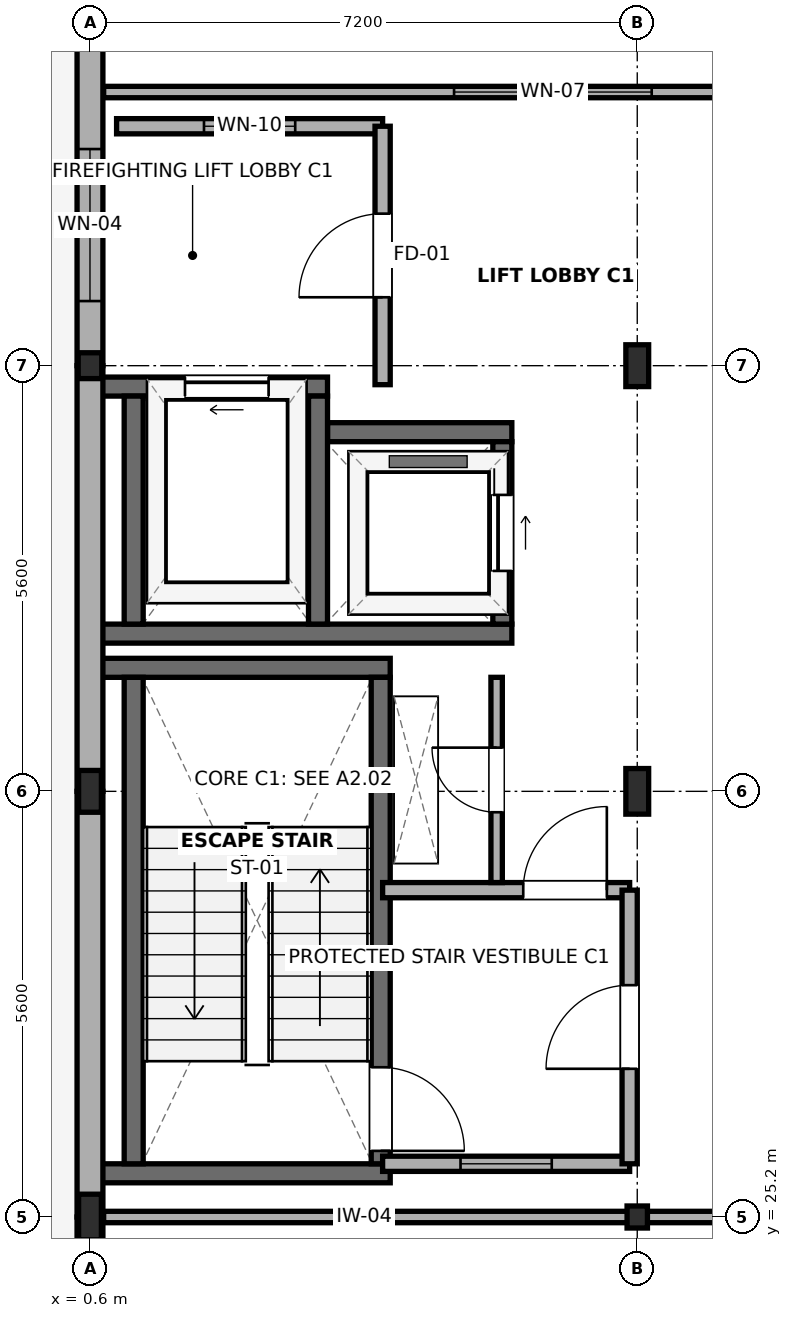
"""IFC4 building model, lengths in metres.
Left out: names, types, materials, properties, quantities, classifications, styles, units other than length and angle.
Written with IfcOpenShell. Run it as: python <this file> out.ifc"""

import sys

from ifc_helpers import new_model, si_unit, direction, frame, frame_2d, origin, origin_2d, place, context, subcontext, project, spatial, rectangle, i_section, extrude, element, fill, save


model = new_model("IFC4")
c1 = context("Model", 3, precision=1e-05, world=origin(), true_north=direction((0.0, 1.0)))
c2 = subcontext(c1, "Body", "Model", "MODEL_VIEW")
j1 = project(units=[si_unit("LENGTHUNIT", "METRE"), si_unit("PLANEANGLEUNIT", "RADIAN")], contexts=[c1])
p1 = place(None, origin())
s1 = spatial("IfcSite", under=j1, at=p1, CompositionType="ELEMENT")
p2 = place(p1, origin())
s2 = spatial("IfcBuilding", under=s1, at=p2, CompositionType="ELEMENT")
p3 = place(p2, frame((0.0, 0.0, 13.2)))
s3 = spatial("IfcBuildingStorey", under=s2, at=p3, CompositionType="ELEMENT", Elevation=13.2)
p4 = place(p3, frame((0.6, 25.2, 0.0), z_axis=(0.0, 0.0, 1.0), x_axis=(1.0, 0.0, 0.0)))
e1 = element("IfcColumn", 1, at=p4, inside=s3, PredefinedType="COLUMN", context=c2, shape_type="SweptSolid", body=[
    extrude(i_section(OverallWidth=0.3, OverallDepth=0.6, WebThickness=0.015, FlangeThickness=0.03, FilletRadius=0.027, at=origin_2d()), origin(), (0.0, 0.0, 1.0), 3.9),
])
p5 = place(p3, frame((0.6, 30.8, 0.0), z_axis=(0.0, 0.0, 1.0), x_axis=(1.0, 0.0, 0.0)))
e2 = element("IfcColumn", 2, at=p5, inside=s3, PredefinedType="COLUMN", context=c2, shape_type="SweptSolid", body=[
    extrude(i_section(OverallWidth=0.3, OverallDepth=0.55, WebThickness=0.015, FlangeThickness=0.029, FilletRadius=0.027, at=origin_2d()), origin(), (0.0, 0.0, 1.0), 3.9),
])
p6 = place(p3, frame((0.6, 36.4, 0.0), z_axis=(0.0, 0.0, 1.0), x_axis=(1.0, 0.0, 0.0)))
e3 = element("IfcColumn", 3, at=p6, inside=s3, PredefinedType="COLUMN", context=c2, shape_type="SweptSolid", body=[
    extrude(i_section(OverallWidth=0.31, OverallDepth=0.34, WebThickness=0.021, FlangeThickness=0.039, FilletRadius=0.027, at=origin_2d()), origin(), (0.0, 0.0, 1.0), 3.9),
])
p7 = place(p3, frame((7.8, 25.2, 0.0), z_axis=(0.0, 0.0, 1.0), x_axis=(1.0, 0.0, 0.0)))
e4 = element("IfcColumn", 4, at=p7, inside=s3, PredefinedType="COLUMN", context=c2, shape_type="SweptSolid", body=[
    extrude(i_section(OverallWidth=0.268, OverallDepth=0.29, WebThickness=0.018, FlangeThickness=0.032, FilletRadius=0.024, at=origin_2d()), origin(), (0.0, 0.0, 1.0), 3.9),
])
p8 = place(p3, frame((7.8, 30.8, 0.0), z_axis=(0.0, 0.0, 1.0), x_axis=(1.0, 0.0, 0.0)))
e5 = element("IfcColumn", 5, at=p8, inside=s3, PredefinedType="COLUMN", context=c2, shape_type="SweptSolid", body=[
    extrude(i_section(OverallWidth=0.3, OverallDepth=0.6, WebThickness=0.015, FlangeThickness=0.03, FilletRadius=0.027, at=origin_2d()), origin(), (0.0, 0.0, 1.0), 3.9),
])
p9 = place(p3, frame((7.8, 36.4, 0.0), z_axis=(0.0, 0.0, 1.0), x_axis=(1.0, 0.0, 0.0)))
e6 = element("IfcColumn", 6, at=p9, inside=s3, PredefinedType="COLUMN", context=c2, shape_type="SweptSolid", body=[
    extrude(i_section(OverallWidth=0.3, OverallDepth=0.55, WebThickness=0.015, FlangeThickness=0.029, FilletRadius=0.027, at=origin_2d()), origin(), (0.0, 0.0, 1.0), 3.9),
])
for number, where, z_axis, x_axis in (
    (7, (0.75, 25.775, 0.0), (0.0, 0.0, 1.0), (1.0, 0.0, 0.0)),
    (8, (0.75, 32.425, 0.0), (0.0, 0.0, 1.0), (1.0, 0.0, 0.0)),
):
    element("IfcWall", number, at=place(p3, frame(where, z_axis=z_axis, x_axis=x_axis)), inside=s3, PredefinedType="SHEAR", context=c2, shape_type="SweptSolid", body=[
        extrude(rectangle(XDim=3.8, YDim=0.25, at=frame_2d((1.9, 0.0))), origin(), (0.0, 0.0, 1.0), 3.7),
    ])
p10 = place(p3, frame((1.175, 25.9, 0.0), z_axis=(0.0, 0.0, 1.0), x_axis=(0.0, 1.0, 0.0)))
e9 = element("IfcWall", 9, at=p10, inside=s3, PredefinedType="SHEAR", context=c2, shape_type="SweptSolid", body=[
    extrude(rectangle(XDim=6.4, YDim=0.25, at=frame_2d((3.2, 0.0))), origin(), (0.0, 0.0, 1.0), 3.7),
])
p11 = place(p3, frame((4.425, 25.9, 0.0), z_axis=(0.0, 0.0, 1.0), x_axis=(0.0, 1.0, 0.0)))
e10 = element("IfcWall", 10, at=p11, inside=s3, PredefinedType="SHEAR", context=c2, shape_type="SweptSolid", body=[
    extrude(rectangle(XDim=6.4, YDim=0.25, at=frame_2d((3.2, 0.0))), origin(), (0.0, 0.0, 1.0), 3.7),
])
p12 = place(p11, frame((0.17, 0.0, 0.0)))
e11 = element("IfcOpeningElement", 11, at=p12, cuts=e10, PredefinedType="OPENING", context=c2, shape_type="SweptSolid", body=[
    extrude(rectangle(XDim=1.1, YDim=2.15, at=frame_2d((0.55, 1.075))), frame((0.0, 0.14, 0.0), z_axis=(0.0, -1.0, 0.0), x_axis=(1.0, 0.0, 0.0)), (0.0, 0.0, 1.0), 0.28),
])
p13 = place(p3, frame((0.75, 32.875, 0.0), z_axis=(0.0, 0.0, 1.0), x_axis=(1.0, 0.0, 0.0)))
e12 = element("IfcWall", 12, at=p13, inside=s3, PredefinedType="SHEAR", context=c2, shape_type="SweptSolid", body=[
    extrude(rectangle(XDim=5.4, YDim=0.25, at=frame_2d((2.7, 0.0))), origin(), (0.0, 0.0, 1.0), 3.7),
])
p14 = place(p3, frame((0.75, 36.125, 0.0), z_axis=(0.0, 0.0, 1.0), x_axis=(1.0, 0.0, 0.0)))
e13 = element("IfcWall", 13, at=p14, inside=s3, PredefinedType="SHEAR", context=c2, shape_type="SweptSolid", body=[
    extrude(rectangle(XDim=2.975, YDim=0.25, at=frame_2d((1.488, 0.0))), origin(), (0.0, 0.0, 1.0), 3.7),
])
p15 = place(p14, frame((1.1, 0.0, 0.0)))
e14 = element("IfcOpeningElement", 14, at=p15, cuts=e13, PredefinedType="OPENING", context=c2, shape_type="SweptSolid", body=[
    extrude(rectangle(XDim=1.1, YDim=2.15, at=frame_2d((0.55, 1.075))), frame((0.0, 0.14, 0.0), z_axis=(0.0, -1.0, 0.0), x_axis=(1.0, 0.0, 0.0)), (0.0, 0.0, 1.0), 0.28),
])
p16 = place(p3, frame((3.725, 35.525, 0.0), z_axis=(0.0, 0.0, 1.0), x_axis=(1.0, 0.0, 0.0)))
e15 = element("IfcWall", 15, at=p16, inside=s3, PredefinedType="SHEAR", context=c2, shape_type="SweptSolid", body=[
    extrude(rectangle(XDim=2.425, YDim=0.25, at=frame_2d((1.212, 0.0))), origin(), (0.0, 0.0, 1.0), 3.7),
])
for number, where, z_axis, x_axis in (
    (16, (1.175, 33.0, 0.0), (0.0, 0.0, 1.0), (0.0, 1.0, 0.0)),
    (17, (3.6, 33.0, 0.0), (0.0, 0.0, 1.0), (0.0, 1.0, 0.0)),
):
    element("IfcWall", number, at=place(p3, frame(where, z_axis=z_axis, x_axis=x_axis)), inside=s3, PredefinedType="SHEAR", context=c2, shape_type="SweptSolid", body=[
        extrude(rectangle(XDim=3.0, YDim=0.25, at=frame_2d((1.5, 0.0))), origin(), (0.0, 0.0, 1.0), 3.7),
    ])
p17 = place(p3, frame((6.025, 33.0, 0.0), z_axis=(0.0, 0.0, 1.0), x_axis=(0.0, 1.0, 0.0)))
e18 = element("IfcWall", 18, at=p17, inside=s3, PredefinedType="SHEAR", context=c2, shape_type="SweptSolid", body=[
    extrude(rectangle(XDim=2.4, YDim=0.25, at=frame_2d((1.2, 0.0))), origin(), (0.0, 0.0, 1.0), 3.7),
])
p18 = place(p17, frame((0.7, 0.0, 0.0)))
e19 = element("IfcOpeningElement", 19, at=p18, cuts=e18, PredefinedType="OPENING", context=c2, shape_type="SweptSolid", body=[
    extrude(rectangle(XDim=1.0, YDim=2.15, at=frame_2d((0.5, 1.075))), frame((0.0, 0.14, 0.0), z_axis=(0.0, -1.0, 0.0), x_axis=(1.0, 0.0, 0.0)), (0.0, 0.0, 1.0), 0.28),
])
p19 = place(p3, frame((0.6, 17.23, 0.0), z_axis=(0.0, 0.0, 1.0), x_axis=(0.0, 1.0, 0.0)))
e20 = element("IfcWall", 20, at=p19, inside=s3, PredefinedType="SOLIDWALL", context=c2, shape_type="SweptSolid", body=[
    extrude(rectangle(XDim=7.97, YDim=0.34, at=frame_2d((3.985, 0.0))), origin(), (0.0, 0.0, 1.0), 3.145),
])
p20 = place(p3, frame((0.6, 25.2, 0.0), z_axis=(0.0, 0.0, 1.0), x_axis=(0.0, 1.0, 0.0)))
e21 = element("IfcWall", 21, at=p20, inside=s3, PredefinedType="SOLIDWALL", context=c2, shape_type="SweptSolid", body=[
    extrude(rectangle(XDim=5.6, YDim=0.34, at=frame_2d((2.8, 0.0))), origin(), (0.0, 0.0, 1.0), 3.195),
])
p21 = place(p3, frame((0.6, 30.8, 0.0), z_axis=(0.0, 0.0, 1.0), x_axis=(0.0, 1.0, 0.0)))
e22 = element("IfcWall", 22, at=p21, inside=s3, PredefinedType="SOLIDWALL", context=c2, shape_type="SweptSolid", body=[
    extrude(rectangle(XDim=5.6, YDim=0.34, at=frame_2d((2.8, 0.0))), origin(), (0.0, 0.0, 1.0), 3.245),
])
p22 = place(p3, frame((0.6, 36.4, 0.0), z_axis=(0.0, 0.0, 1.0), x_axis=(0.0, 1.0, 0.0)))
e23 = element("IfcWall", 23, at=p22, inside=s3, PredefinedType="SOLIDWALL", context=c2, shape_type="SweptSolid", body=[
    extrude(rectangle(XDim=5.6, YDim=0.34, at=frame_2d((2.8, 0.0))), origin(), (0.0, 0.0, 1.0), 3.245),
])
p23 = place(p22, frame((0.85, 0.0, 0.9)))
e24 = element("IfcOpeningElement", 24, at=p23, cuts=e23, PredefinedType="OPENING", context=c2, shape_type="SweptSolid", body=[
    extrude(rectangle(XDim=2.0, YDim=1.8, at=frame_2d((1.0, 0.9))), frame((0.0, 0.185, 0.0), z_axis=(0.0, -1.0, 0.0), x_axis=(1.0, 0.0, 0.0)), (0.0, 0.0, 1.0), 0.37),
])
p24 = place(p3, frame((0.95, 39.55, 0.0), z_axis=(0.0, 0.0, 1.0), x_axis=(1.0, 0.0, 0.0)))
e25 = element("IfcWall", 25, at=p24, inside=s3, PredefinedType="PARTITIONING", context=c2, shape_type="SweptSolid", body=[
    extrude(rectangle(XDim=3.5, YDim=0.2, at=frame_2d((1.75, 0.0))), origin(), (0.0, 0.0, 1.0), 3.695),
])
p25 = place(p24, frame((1.15, 0.0, 0.95)))
e26 = element("IfcOpeningElement", 26, at=p25, cuts=e25, PredefinedType="OPENING", context=c2, shape_type="SweptSolid", body=[
    extrude(rectangle(XDim=1.2, YDim=1.5, at=frame_2d((0.6, 0.75))), frame((0.0, 0.115, 0.0), z_axis=(0.0, -1.0, 0.0), x_axis=(1.0, 0.0, 0.0)), (0.0, 0.0, 1.0), 0.23),
])
p26 = place(p3, frame((4.45, 36.15, 0.0), z_axis=(0.0, 0.0, 1.0), x_axis=(0.0, 1.0, 0.0)))
e27 = element("IfcWall", 27, at=p26, inside=s3, PredefinedType="PARTITIONING", context=c2, shape_type="SweptSolid", body=[
    extrude(rectangle(XDim=3.4, YDim=0.2, at=frame_2d((1.7, 0.0))), origin(), (0.0, 0.0, 1.0), 3.345),
])
p27 = place(p26, frame((1.15, 0.0, 0.0)))
e28 = element("IfcOpeningElement", 28, at=p27, cuts=e27, PredefinedType="OPENING", context=c2, shape_type="SweptSolid", body=[
    extrude(rectangle(XDim=1.1, YDim=2.15, at=frame_2d((0.55, 1.075))), frame((0.0, 0.115, 0.0), z_axis=(0.0, -1.0, 0.0), x_axis=(1.0, 0.0, 0.0)), (0.0, 0.0, 1.0), 0.23),
])
p28 = place(p3, frame((4.45, 25.9, 0.0), z_axis=(0.0, 0.0, 1.0), x_axis=(1.0, 0.0, 0.0)))
e29 = element("IfcWall", 29, at=p28, inside=s3, PredefinedType="PARTITIONING", context=c2, shape_type="SweptSolid", body=[
    extrude(rectangle(XDim=3.25, YDim=0.2, at=frame_2d((1.625, 0.0))), origin(), (0.0, 0.0, 1.0), 3.095),
])
p29 = place(p28, frame((1.025, 0.0, 0.95)))
e30 = element("IfcOpeningElement", 30, at=p29, cuts=e29, PredefinedType="OPENING", context=c2, shape_type="SweptSolid", body=[
    extrude(rectangle(XDim=1.2, YDim=1.5, at=frame_2d((0.6, 0.75))), frame((0.0, 0.115, 0.0), z_axis=(0.0, -1.0, 0.0), x_axis=(1.0, 0.0, 0.0)), (0.0, 0.0, 1.0), 0.23),
])
p30 = place(p3, frame((4.45, 29.5, 0.0), z_axis=(0.0, 0.0, 1.0), x_axis=(1.0, 0.0, 0.0)))
e31 = element("IfcWall", 31, at=p30, inside=s3, PredefinedType="PARTITIONING", context=c2, shape_type="SweptSolid", body=[
    extrude(rectangle(XDim=3.25, YDim=0.2, at=frame_2d((1.625, 0.0))), origin(), (0.0, 0.0, 1.0), 3.095),
])
p31 = place(p30, frame((1.85, 0.0, 0.0)))
e32 = element("IfcOpeningElement", 32, at=p31, cuts=e31, PredefinedType="OPENING", context=c2, shape_type="SweptSolid", body=[
    extrude(rectangle(XDim=1.1, YDim=2.15, at=frame_2d((0.55, 1.075))), frame((0.0, 0.115, 0.0), z_axis=(0.0, -1.0, 0.0), x_axis=(1.0, 0.0, 0.0)), (0.0, 0.0, 1.0), 0.23),
])
p32 = place(p3, frame((7.7, 25.9, 0.0), z_axis=(0.0, 0.0, 1.0), x_axis=(0.0, 1.0, 0.0)))
e33 = element("IfcWall", 33, at=p32, inside=s3, PredefinedType="PARTITIONING", context=c2, shape_type="SweptSolid", body=[
    extrude(rectangle(XDim=3.6, YDim=0.2, at=frame_2d((1.8, 0.0))), origin(), (0.0, 0.0, 1.0), 3.095),
])
p33 = place(p32, frame((1.25, 0.0, 0.0)))
e34 = element("IfcOpeningElement", 34, at=p33, cuts=e33, PredefinedType="OPENING", context=c2, shape_type="SweptSolid", body=[
    extrude(rectangle(XDim=1.1, YDim=2.15, at=frame_2d((0.55, 1.075))), frame((0.0, 0.115, 0.0), z_axis=(0.0, -1.0, 0.0), x_axis=(1.0, 0.0, 0.0)), (0.0, 0.0, 1.0), 0.23),
])
p34 = place(p3, frame((5.95, 29.6, 0.0), z_axis=(0.0, 0.0, 1.0), x_axis=(0.0, 1.0, 0.0)))
e35 = element("IfcWall", 35, at=p34, inside=s3, PredefinedType="PARTITIONING", context=c2, shape_type="SweptSolid", body=[
    extrude(rectangle(XDim=2.7, YDim=0.15, at=frame_2d((1.35, 0.0))), origin(), (0.0, 0.0, 1.0), 3.695),
])
p35 = place(p34, frame((0.925, 0.0, 0.0)))
e36 = element("IfcOpeningElement", 36, at=p35, cuts=e35, PredefinedType="OPENING", context=c2, shape_type="SweptSolid", body=[
    extrude(rectangle(XDim=0.85, YDim=2.1, at=frame_2d((0.425, 1.05))), frame((0.0, 0.09, 0.0), z_axis=(0.0, -1.0, 0.0), x_axis=(1.0, 0.0, 0.0)), (0.0, 0.0, 1.0), 0.18),
])
p36 = place(p3, frame((0.78, 25.2, 0.0), z_axis=(0.0, 0.0, 1.0), x_axis=(1.0, 0.0, 0.0)))
e37 = element("IfcWall", 37, at=p36, inside=s3, PredefinedType="PARTITIONING", context=c2, shape_type="SweptSolid", body=[
    extrude(rectangle(XDim=11.82, YDim=0.15, at=frame_2d((5.91, 0.0))), origin(), (0.0, 0.0, 1.0), 3.095),
])
p37 = place(p3, frame((0.78, 40.0, 0.0), z_axis=(0.0, 0.0, 1.0), x_axis=(1.0, 0.0, 0.0)))
e38 = element("IfcWall", 38, at=p37, inside=s3, PredefinedType="PARTITIONING", context=c2, shape_type="SweptSolid", body=[
    extrude(rectangle(XDim=11.82, YDim=0.15, at=frame_2d((5.91, 0.0))), origin(), (0.0, 0.0, 1.0), 3.195),
])
p38 = place(p37, frame((4.61, 0.0, 0.95)))
e39 = element("IfcOpeningElement", 39, at=p38, cuts=e38, PredefinedType="OPENING", context=c2, shape_type="SweptSolid", body=[
    extrude(rectangle(XDim=2.6, YDim=1.5, at=frame_2d((1.3, 0.75))), frame((0.0, 0.09, 0.0), z_axis=(0.0, -1.0, 0.0), x_axis=(1.0, 0.0, 0.0)), (0.0, 0.0, 1.0), 0.18),
])
p39 = place(p23, origin())
e40 = element("IfcWindow", 40, at=p39, inside=s3, PartitioningType="SINGLE_PANEL", PredefinedType="WINDOW", context=c2, shape_type="SweptSolid", body=[
    extrude(rectangle(XDim=2.0, YDim=1.8, at=frame_2d((1.0, 0.9))), frame((0.0, 0.03, 0.0), z_axis=(0.0, -1.0, 0.0), x_axis=(1.0, 0.0, 0.0)), (0.0, 0.0, 1.0), 0.06),
])
fill(e24, e40)
p40 = place(p12, frame((1.1, 0.0, 0.0), z_axis=(0.0, 0.0, 1.0), x_axis=(-1.0, 0.0, 0.0)))
e41 = element("IfcDoor", 41, at=p40, inside=s3, OperationType="SINGLE_SWING_RIGHT", PredefinedType="DOOR", context=c2, shape_type="SweptSolid", body=[
    extrude(rectangle(XDim=1.1, YDim=2.15, at=frame_2d((0.55, 1.075))), frame((0.0, 0.025, 0.0), z_axis=(0.0, -1.0, 0.0), x_axis=(1.0, 0.0, 0.0)), (0.0, 0.0, 1.0), 0.05),
])
fill(e11, e41)
p41 = place(p15, origin())
e42 = element("IfcDoor", 42, at=p41, inside=s3, OperationType="SLIDING_TO_LEFT", PredefinedType="DOOR", context=c2, shape_type="SweptSolid", body=[
    extrude(rectangle(XDim=1.1, YDim=2.15, at=frame_2d((0.55, 1.075))), frame((0.0, 0.025, 0.0), z_axis=(0.0, -1.0, 0.0), x_axis=(1.0, 0.0, 0.0)), (0.0, 0.0, 1.0), 0.05),
])
fill(e14, e42)
p42 = place(p18, frame((1.0, 0.0, 0.0), z_axis=(0.0, 0.0, 1.0), x_axis=(-1.0, 0.0, 0.0)))
e43 = element("IfcDoor", 43, at=p42, inside=s3, OperationType="SLIDING_TO_RIGHT", PredefinedType="DOOR", context=c2, shape_type="SweptSolid", body=[
    extrude(rectangle(XDim=1.0, YDim=2.15, at=frame_2d((0.5, 1.075))), frame((0.0, 0.025, 0.0), z_axis=(0.0, -1.0, 0.0), x_axis=(1.0, 0.0, 0.0)), (0.0, 0.0, 1.0), 0.05),
])
fill(e19, e43)
p43 = place(p25, origin())
e44 = element("IfcWindow", 44, at=p43, inside=s3, PartitioningType="SINGLE_PANEL", PredefinedType="WINDOW", context=c2, shape_type="SweptSolid", body=[
    extrude(rectangle(XDim=1.2, YDim=1.5, at=frame_2d((0.6, 0.75))), frame((0.0, 0.03, 0.0), z_axis=(0.0, -1.0, 0.0), x_axis=(1.0, 0.0, 0.0)), (0.0, 0.0, 1.0), 0.06),
])
fill(e26, e44)
p44 = place(p27, origin())
e45 = element("IfcDoor", 45, at=p44, inside=s3, OperationType="SINGLE_SWING_LEFT", PredefinedType="DOOR", context=c2, shape_type="SweptSolid", body=[
    extrude(rectangle(XDim=1.1, YDim=2.15, at=frame_2d((0.55, 1.075))), frame((0.0, 0.025, 0.0), z_axis=(0.0, -1.0, 0.0), x_axis=(1.0, 0.0, 0.0)), (0.0, 0.0, 1.0), 0.05),
])
fill(e28, e45)
p45 = place(p29, origin())
e46 = element("IfcWindow", 46, at=p45, inside=s3, PartitioningType="SINGLE_PANEL", PredefinedType="WINDOW", context=c2, shape_type="SweptSolid", body=[
    extrude(rectangle(XDim=1.2, YDim=1.5, at=frame_2d((0.6, 0.75))), frame((0.0, 0.03, 0.0), z_axis=(0.0, -1.0, 0.0), x_axis=(1.0, 0.0, 0.0)), (0.0, 0.0, 1.0), 0.06),
])
fill(e30, e46)
p46 = place(p31, origin())
e47 = element("IfcDoor", 47, at=p46, inside=s3, OperationType="SINGLE_SWING_RIGHT", PredefinedType="DOOR", context=c2, shape_type="SweptSolid", body=[
    extrude(rectangle(XDim=1.1, YDim=2.15, at=frame_2d((0.55, 1.075))), frame((0.0, 0.025, 0.0), z_axis=(0.0, -1.0, 0.0), x_axis=(1.0, 0.0, 0.0)), (0.0, 0.0, 1.0), 0.05),
])
fill(e32, e47)
p47 = place(p33, origin())
e48 = element("IfcDoor", 48, at=p47, inside=s3, OperationType="SINGLE_SWING_LEFT", PredefinedType="DOOR", context=c2, shape_type="SweptSolid", body=[
    extrude(rectangle(XDim=1.1, YDim=2.15, at=frame_2d((0.55, 1.075))), frame((0.0, 0.025, 0.0), z_axis=(0.0, -1.0, 0.0), x_axis=(1.0, 0.0, 0.0)), (0.0, 0.0, 1.0), 0.05),
])
fill(e34, e48)
p48 = place(p35, origin())
e49 = element("IfcDoor", 49, at=p48, inside=s3, OperationType="SINGLE_SWING_RIGHT", PredefinedType="DOOR", context=c2, shape_type="SweptSolid", body=[
    extrude(rectangle(XDim=0.85, YDim=2.1, at=frame_2d((0.425, 1.05))), frame((0.0, 0.025, 0.0), z_axis=(0.0, -1.0, 0.0), x_axis=(1.0, 0.0, 0.0)), (0.0, 0.0, 1.0), 0.05),
])
fill(e36, e49)
p49 = place(p38, origin())
e50 = element("IfcWindow", 50, at=p49, inside=s3, PartitioningType="SINGLE_PANEL", PredefinedType="WINDOW", context=c2, shape_type="SweptSolid", body=[
    extrude(rectangle(XDim=2.6, YDim=1.5, at=frame_2d((1.3, 0.75))), frame((0.0, 0.03, 0.0), z_axis=(0.0, -1.0, 0.0), x_axis=(1.0, 0.0, 0.0)), (0.0, 0.0, 1.0), 0.06),
])
fill(e39, e50)
save(model, sys.argv[1])
